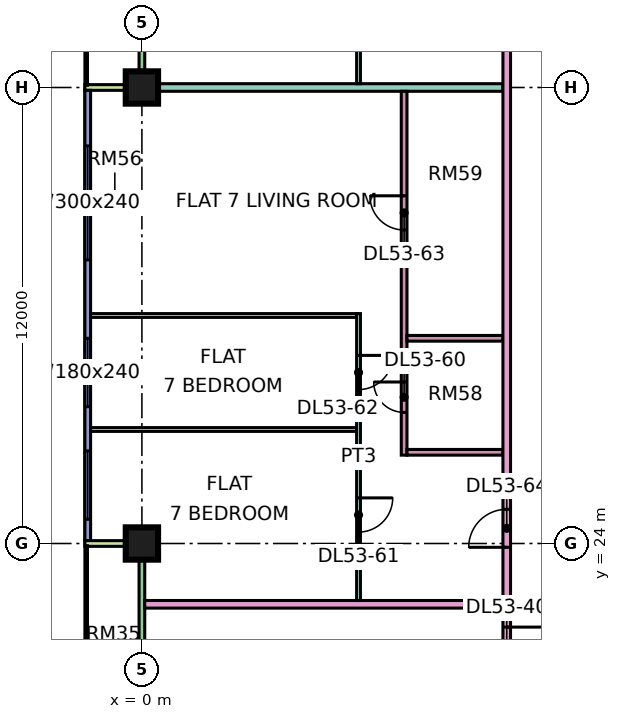
"""IFC4 building model, lengths in metres.
Left out: names, types, materials, properties, quantities, classifications, styles, units other than length and angle.
Written with IfcOpenShell. Run it as: python <this file> out.ifc"""

import sys

from ifc_helpers import new_model, si_unit, direction, frame, frame_2d, origin, origin_2d, place, context, subcontext, project, spatial, rectangle, extrude, element, fill, save


model = new_model("IFC4")
c1 = context("Model", 3, precision=1e-05, world=origin(), true_north=direction((0.0, 1.0)))
c2 = subcontext(c1, "Body", "Model", "MODEL_VIEW")
j1 = project(units=[si_unit("LENGTHUNIT", "METRE"), si_unit("PLANEANGLEUNIT", "RADIAN")], contexts=[c1])
p1 = place(None, origin())
s1 = spatial("IfcSite", under=j1, at=p1, CompositionType="ELEMENT")
p2 = place(p1, origin())
s2 = spatial("IfcBuilding", under=s1, at=p2, CompositionType="ELEMENT")
p3 = place(p2, frame((0.0, 0.0, 226.65)))
s3 = spatial("IfcBuildingStorey", under=s2, at=p3, CompositionType="ELEMENT", Elevation=226.65)
p4 = place(p3, frame((0.0, 24.0, 0.0), z_axis=(0.0, 0.0, 1.0), x_axis=(1.0, 0.0, 0.0)))
e1 = element("IfcColumn", 1, at=p4, inside=s3, PredefinedType="COLUMN", context=c2, shape_type="SweptSolid", body=[
    extrude(rectangle(XDim=0.85, YDim=0.85, at=origin_2d()), origin(), (0.0, 0.0, 1.0), 3.75),
])
p5 = place(p3, frame((0.0, 36.0, 0.0), z_axis=(0.0, 0.0, 1.0), x_axis=(1.0, 0.0, 0.0)))
e2 = element("IfcColumn", 2, at=p5, inside=s3, PredefinedType="COLUMN", context=c2, shape_type="SweptSolid", body=[
    extrude(rectangle(XDim=0.85, YDim=0.85, at=origin_2d()), origin(), (0.0, 0.0, 1.0), 3.75),
])
p6 = place(p3, frame((0.0, 47.925, 0.0), z_axis=(0.0, 0.0, 1.0), x_axis=(0.0, -1.0, 0.0)))
e3 = element("IfcWall", 3, at=p6, inside=s3, PredefinedType="SOLIDWALL", context=c2, shape_type="SweptSolid", body=[
    extrude(rectangle(XDim=11.85, YDim=0.15, at=frame_2d((5.925, 0.0))), origin(), (0.0, 0.0, 1.0), 3.35),
])
p7 = place(p6, frame((0.6, 0.0, 0.45)))
e4 = element("IfcOpeningElement", 4, at=p7, cuts=e3, PredefinedType="OPENING", context=c2, shape_type="SweptSolid", body=[
    extrude(rectangle(XDim=1.2, YDim=2.4, at=frame_2d((0.6, 1.2))), frame((0.0, 0.085, 0.0), z_axis=(0.0, -1.0, 0.0), x_axis=(1.0, 0.0, 0.0)), (0.0, 0.0, 1.0), 0.17),
])
p8 = place(p6, frame((4.087, 0.0, 0.0)))
e5 = element("IfcOpeningElement", 5, at=p8, cuts=e3, PredefinedType="OPENING", context=c2, shape_type="SweptSolid", body=[
    extrude(rectangle(XDim=1.2, YDim=2.4, at=frame_2d((0.6, 1.2))), frame((0.0, 0.085, 0.0), z_axis=(0.0, -1.0, 0.0), x_axis=(1.0, 0.0, 0.0)), (0.0, 0.0, 1.0), 0.17),
])
p9 = place(p6, frame((6.525, 0.0, 0.45)))
e6 = element("IfcOpeningElement", 6, at=p9, cuts=e3, PredefinedType="OPENING", context=c2, shape_type="SweptSolid", body=[
    extrude(rectangle(XDim=1.8, YDim=2.4, at=frame_2d((0.9, 1.2))), frame((0.0, 0.085, 0.0), z_axis=(0.0, -1.0, 0.0), x_axis=(1.0, 0.0, 0.0)), (0.0, 0.0, 1.0), 0.17),
])
p10 = place(p6, frame((9.562, 0.0, 0.45)))
e7 = element("IfcOpeningElement", 7, at=p10, cuts=e3, PredefinedType="OPENING", context=c2, shape_type="SweptSolid", body=[
    extrude(rectangle(XDim=1.2, YDim=2.4, at=frame_2d((0.6, 1.2))), frame((0.0, 0.085, 0.0), z_axis=(0.0, -1.0, 0.0), x_axis=(1.0, 0.0, 0.0)), (0.0, 0.0, 1.0), 0.17),
])
p11 = place(p3, frame((-1.5, 36.0, 0.0), z_axis=(0.0, 0.0, 1.0), x_axis=(1.0, 0.0, 0.0)))
e8 = element("IfcWall", 8, at=p11, inside=s3, PredefinedType="SOLIDWALL", context=c2, shape_type="SweptSolid", body=[
    extrude(rectangle(XDim=1.5, YDim=0.15, at=frame_2d((0.75, 0.0))), origin(), (0.0, 0.0, 1.0), 3.35),
])
p12 = place(p3, frame((-1.425, 35.925, 0.0), z_axis=(0.0, 0.0, 1.0), x_axis=(0.0, -1.0, 0.0)))
e9 = element("IfcWall", 9, at=p12, inside=s3, PredefinedType="SOLIDWALL", context=c2, shape_type="SweptSolid", body=[
    extrude(rectangle(XDim=11.85, YDim=0.15, at=frame_2d((5.925, 0.0))), origin(), (0.0, 0.0, 1.0), 3.35),
])
p13 = place(p12, frame((1.462, 0.0, 0.45)))
e10 = element("IfcOpeningElement", 10, at=p13, cuts=e9, PredefinedType="OPENING", context=c2, shape_type="SweptSolid", body=[
    extrude(rectangle(XDim=3.0, YDim=2.4, at=frame_2d((1.5, 1.2))), frame((0.0, 0.085, 0.0), z_axis=(0.0, -1.0, 0.0), x_axis=(1.0, 0.0, 0.0)), (0.0, 0.0, 1.0), 0.17),
])
p14 = place(p12, frame((6.525, 0.0, 0.45)))
e11 = element("IfcOpeningElement", 11, at=p14, cuts=e9, PredefinedType="OPENING", context=c2, shape_type="SweptSolid", body=[
    extrude(rectangle(XDim=1.8, YDim=2.4, at=frame_2d((0.9, 1.2))), frame((0.0, 0.085, 0.0), z_axis=(0.0, -1.0, 0.0), x_axis=(1.0, 0.0, 0.0)), (0.0, 0.0, 1.0), 0.17),
])
p15 = place(p12, frame((9.488, 0.0, 0.45)))
e12 = element("IfcOpeningElement", 12, at=p15, cuts=e9, PredefinedType="OPENING", context=c2, shape_type="SweptSolid", body=[
    extrude(rectangle(XDim=1.8, YDim=2.4, at=frame_2d((0.9, 1.2))), frame((0.0, 0.085, 0.0), z_axis=(0.0, -1.0, 0.0), x_axis=(1.0, 0.0, 0.0)), (0.0, 0.0, 1.0), 0.17),
])
p16 = place(p3, frame((0.0, 23.925, 0.0), z_axis=(0.0, 0.0, 1.0), x_axis=(0.0, -1.0, 0.0)))
e13 = element("IfcWall", 13, at=p16, inside=s3, PredefinedType="SOLIDWALL", context=c2, shape_type="SweptSolid", body=[
    extrude(rectangle(XDim=11.35, YDim=0.15, at=frame_2d((5.675, 0.0))), origin(), (0.0, 0.0, 1.0), 3.35),
])
p17 = place(p16, frame((6.738, 0.0, 0.0)))
e14 = element("IfcOpeningElement", 14, at=p17, cuts=e13, PredefinedType="OPENING", context=c2, shape_type="SweptSolid", body=[
    extrude(rectangle(XDim=1.8, YDim=2.4, at=frame_2d((0.9, 1.2))), frame((0.0, 0.085, 0.0), z_axis=(0.0, -1.0, 0.0), x_axis=(1.0, 0.0, 0.0)), (0.0, 0.0, 1.0), 0.17),
])
p18 = place(p3, frame((-1.5, 24.0, 0.0), z_axis=(0.0, 0.0, 1.0), x_axis=(1.0, 0.0, 0.0)))
e15 = element("IfcWall", 15, at=p18, inside=s3, PredefinedType="SOLIDWALL", context=c2, shape_type="SweptSolid", body=[
    extrude(rectangle(XDim=1.5, YDim=0.15, at=frame_2d((0.75, 0.0))), origin(), (0.0, 0.0, 1.0), 3.35),
])
p19 = place(p3, frame((-1.351, 27.0, 0.0), z_axis=(0.0, 0.0, 1.0), x_axis=(1.0, 0.0, 0.0)))
e16 = element("IfcWall", 16, at=p19, inside=s3, PredefinedType="PARTITIONING", context=c2, shape_type="SweptSolid", body=[
    extrude(rectangle(XDim=7.001, YDim=0.1, at=frame_2d((3.5, 0.0))), origin(), (0.0, 0.0, 1.0), 3.35),
])
p20 = place(p3, frame((-1.35, 30.0, 0.0), z_axis=(0.0, 0.0, 1.0), x_axis=(1.0, 0.0, 0.0)))
e17 = element("IfcWall", 17, at=p20, inside=s3, PredefinedType="PARTITIONING", context=c2, shape_type="SweptSolid", body=[
    extrude(rectangle(XDim=7.0, YDim=0.1, at=frame_2d((3.5, 0.0))), origin(), (0.0, 0.0, 1.0), 3.35),
])
e18 = element("IfcWall", 18, at=p5, inside=s3, PredefinedType="PARTITIONING", context=c2, shape_type="SweptSolid", body=[
    extrude(rectangle(XDim=9.5, YDim=0.2, at=frame_2d((4.75, 0.0))), origin(), (0.0, 0.0, 1.0), 3.35),
])
p21 = place(p3, frame((0.074, 22.4, 0.0), z_axis=(0.0, 0.0, 1.0), x_axis=(1.0, 0.0, 0.0)))
e19 = element("IfcWall", 19, at=p21, inside=s3, PredefinedType="PARTITIONING", context=c2, shape_type="SweptSolid", body=[
    extrude(rectangle(XDim=9.426, YDim=0.2, at=frame_2d((4.713, 0.0))), origin(), (0.0, 0.0, 1.0), 3.35),
])
p22 = place(p3, frame((5.7, 22.5, 0.0), z_axis=(0.0, 0.0, 1.0), x_axis=(0.0, 1.0, 0.0)))
e20 = element("IfcWall", 20, at=p22, inside=s3, PredefinedType="PARTITIONING", context=c2, shape_type="SweptSolid", body=[
    extrude(rectangle(XDim=7.55, YDim=0.1, at=frame_2d((3.775, 0.0))), origin(), (0.0, 0.0, 1.0), 3.35),
])
p23 = place(p22, frame((1.8, 0.0, 0.0)))
e21 = element("IfcOpeningElement", 21, at=p23, cuts=e20, PredefinedType="OPENING", context=c2, shape_type="SweptSolid", body=[
    extrude(rectangle(XDim=0.9, YDim=2.1, at=frame_2d((0.45, 1.05))), frame((0.0, 0.06, 0.0), z_axis=(0.0, -1.0, 0.0), x_axis=(1.0, 0.0, 0.0)), (0.0, 0.0, 1.0), 0.12),
])
p24 = place(p22, frame((5.55, 0.0, 0.0)))
e22 = element("IfcOpeningElement", 22, at=p24, cuts=e20, PredefinedType="OPENING", context=c2, shape_type="SweptSolid", body=[
    extrude(rectangle(XDim=0.9, YDim=2.1, at=frame_2d((0.45, 1.05))), frame((0.0, 0.06, 0.0), z_axis=(0.0, -1.0, 0.0), x_axis=(1.0, 0.0, 0.0)), (0.0, 0.0, 1.0), 0.12),
])
p25 = place(p3, frame((5.7, 36.1, 0.0), z_axis=(0.0, 0.0, 1.0), x_axis=(0.0, 1.0, 0.0)))
e23 = element("IfcWall", 23, at=p25, inside=s3, PredefinedType="PARTITIONING", context=c2, shape_type="SweptSolid", body=[
    extrude(rectangle(XDim=28.25, YDim=0.1, at=frame_2d((14.125, 0.0))), origin(), (0.0, 0.0, 1.0), 3.35),
])
p26 = place(p25, frame((0.95, 0.0, 0.0)))
e24 = element("IfcOpeningElement", 24, at=p26, cuts=e23, PredefinedType="OPENING", context=c2, shape_type="SweptSolid", body=[
    extrude(rectangle(XDim=0.9, YDim=2.1, at=frame_2d((0.45, 1.05))), frame((0.0, 0.06, 0.0), z_axis=(0.0, -1.0, 0.0), x_axis=(1.0, 0.0, 0.0)), (0.0, 0.0, 1.0), 0.12),
])
p27 = place(p25, frame((3.95, 0.0, 0.0)))
e25 = element("IfcOpeningElement", 25, at=p27, cuts=e23, PredefinedType="OPENING", context=c2, shape_type="SweptSolid", body=[
    extrude(rectangle(XDim=0.9, YDim=2.1, at=frame_2d((0.45, 1.05))), frame((0.0, 0.06, 0.0), z_axis=(0.0, -1.0, 0.0), x_axis=(1.0, 0.0, 0.0)), (0.0, 0.0, 1.0), 0.12),
])
p28 = place(p25, frame((6.95, 0.0, 0.0)))
e26 = element("IfcOpeningElement", 26, at=p28, cuts=e23, PredefinedType="OPENING", context=c2, shape_type="SweptSolid", body=[
    extrude(rectangle(XDim=0.9, YDim=2.1, at=frame_2d((0.45, 1.05))), frame((0.0, 0.06, 0.0), z_axis=(0.0, -1.0, 0.0), x_axis=(1.0, 0.0, 0.0)), (0.0, 0.0, 1.0), 0.12),
])
p29 = place(p25, frame((18.95, 0.0, 0.0)))
e27 = element("IfcOpeningElement", 27, at=p29, cuts=e23, PredefinedType="OPENING", context=c2, shape_type="SweptSolid", body=[
    extrude(rectangle(XDim=0.9, YDim=2.1, at=frame_2d((0.45, 1.05))), frame((0.0, 0.06, 0.0), z_axis=(0.0, -1.0, 0.0), x_axis=(1.0, 0.0, 0.0)), (0.0, 0.0, 1.0), 0.12),
])
p30 = place(p25, frame((21.95, 0.0, 0.0)))
e28 = element("IfcOpeningElement", 28, at=p30, cuts=e23, PredefinedType="OPENING", context=c2, shape_type="SweptSolid", body=[
    extrude(rectangle(XDim=0.9, YDim=2.1, at=frame_2d((0.45, 1.05))), frame((0.0, 0.06, 0.0), z_axis=(0.0, -1.0, 0.0), x_axis=(1.0, 0.0, 0.0)), (0.0, 0.0, 1.0), 0.12),
])
p31 = place(p25, frame((24.95, 0.0, 0.0)))
e29 = element("IfcOpeningElement", 29, at=p31, cuts=e23, PredefinedType="OPENING", context=c2, shape_type="SweptSolid", body=[
    extrude(rectangle(XDim=0.9, YDim=2.1, at=frame_2d((0.45, 1.05))), frame((0.0, 0.06, 0.0), z_axis=(0.0, -1.0, 0.0), x_axis=(1.0, 0.0, 0.0)), (0.0, 0.0, 1.0), 0.12),
])
p32 = place(p25, frame((12.95, 0.0, 0.0)))
e30 = element("IfcOpeningElement", 30, at=p32, cuts=e23, PredefinedType="OPENING", context=c2, shape_type="SweptSolid", body=[
    extrude(rectangle(XDim=0.9, YDim=2.1, at=frame_2d((0.45, 1.05))), frame((0.0, 0.06, 0.0), z_axis=(0.0, -1.0, 0.0), x_axis=(1.0, 0.0, 0.0)), (0.0, 0.0, 1.0), 0.12),
])
p33 = place(p3, frame((6.9, 26.325, 0.0), z_axis=(0.0, 0.0, 1.0), x_axis=(0.0, 1.0, 0.0)))
e31 = element("IfcWall", 31, at=p33, inside=s3, PredefinedType="PARTITIONING", context=c2, shape_type="SweptSolid", body=[
    extrude(rectangle(XDim=9.575, YDim=0.15, at=frame_2d((4.788, 0.0))), origin(), (0.0, 0.0, 1.0), 3.35),
])
p34 = place(p33, frame((1.125, 0.0, 0.0)))
e32 = element("IfcOpeningElement", 32, at=p34, cuts=e31, PredefinedType="OPENING", context=c2, shape_type="SweptSolid", body=[
    extrude(rectangle(XDim=0.8, YDim=2.1, at=frame_2d((0.4, 1.05))), frame((0.0, 0.085, 0.0), z_axis=(0.0, -1.0, 0.0), x_axis=(1.0, 0.0, 0.0)), (0.0, 0.0, 1.0), 0.17),
])
p35 = place(p33, frame((5.925, 0.0, 0.0)))
e33 = element("IfcOpeningElement", 33, at=p35, cuts=e31, PredefinedType="OPENING", context=c2, shape_type="SweptSolid", body=[
    extrude(rectangle(XDim=0.9, YDim=2.1, at=frame_2d((0.45, 1.05))), frame((0.0, 0.085, 0.0), z_axis=(0.0, -1.0, 0.0), x_axis=(1.0, 0.0, 0.0)), (0.0, 0.0, 1.0), 0.17),
])
for number, where, z_axis, x_axis in (
    (34, (6.975, 26.4, 0.0), (0.0, 0.0, 1.0), (1.0, 0.0, 0.0)),
    (35, (6.975, 29.4, 0.0), (0.0, 0.0, 1.0), (1.0, 0.0, 0.0)),
):
    element("IfcWall", number, at=place(p3, frame(where, z_axis=z_axis, x_axis=x_axis)), inside=s3, PredefinedType="PARTITIONING", context=c2, shape_type="SweptSolid", body=[
        extrude(rectangle(XDim=2.525, YDim=0.15, at=frame_2d((1.262, 0.0))), origin(), (0.0, 0.0, 1.0), 3.35),
    ])
p36 = place(p3, frame((9.6, 20.0, 0.0), z_axis=(0.0, 0.0, 1.0), x_axis=(0.0, 1.0, 0.0)))
e36 = element("IfcWall", 36, at=p36, inside=s3, PredefinedType="PARTITIONING", context=c2, shape_type="SweptSolid", body=[
    extrude(rectangle(XDim=44.35, YDim=0.2, at=frame_2d((22.175, 0.0))), origin(), (0.0, 0.0, 1.0), 3.35),
])
p37 = place(p36, frame((17.1, 0.0, 0.0)))
e37 = element("IfcOpeningElement", 37, at=p37, cuts=e36, PredefinedType="OPENING", context=c2, shape_type="SweptSolid", body=[
    extrude(rectangle(XDim=1.0, YDim=2.1, at=frame_2d((0.5, 1.05))), frame((0.0, 0.11, 0.0), z_axis=(0.0, -1.0, 0.0), x_axis=(1.0, 0.0, 0.0)), (0.0, 0.0, 1.0), 0.22),
])
p38 = place(p36, frame((0.6, 0.0, 0.0)))
e38 = element("IfcOpeningElement", 38, at=p38, cuts=e36, PredefinedType="OPENING", context=c2, shape_type="SweptSolid", body=[
    extrude(rectangle(XDim=1.2, YDim=2.1, at=frame_2d((0.6, 1.05))), frame((0.0, 0.11, 0.0), z_axis=(0.0, -1.0, 0.0), x_axis=(1.0, 0.0, 0.0)), (0.0, 0.0, 1.0), 0.22),
])
p39 = place(p36, frame((3.9, 0.0, 0.0)))
e39 = element("IfcOpeningElement", 39, at=p39, cuts=e36, PredefinedType="OPENING", context=c2, shape_type="SweptSolid", body=[
    extrude(rectangle(XDim=1.0, YDim=2.1, at=frame_2d((0.5, 1.05))), frame((0.0, 0.11, 0.0), z_axis=(0.0, -1.0, 0.0), x_axis=(1.0, 0.0, 0.0)), (0.0, 0.0, 1.0), 0.22),
])
p40 = place(p13, origin())
e40 = element("IfcWindow", 40, at=p40, inside=s3, PartitioningType="SINGLE_PANEL", PredefinedType="WINDOW", context=c2, shape_type="SweptSolid", body=[
    extrude(rectangle(XDim=3.0, YDim=2.4, at=frame_2d((1.5, 1.2))), frame((0.0, 0.03, 0.0), z_axis=(0.0, -1.0, 0.0), x_axis=(1.0, 0.0, 0.0)), (0.0, 0.0, 1.0), 0.06),
])
fill(e10, e40)
p41 = place(p14, origin())
e41 = element("IfcWindow", 41, at=p41, inside=s3, PartitioningType="SINGLE_PANEL", PredefinedType="WINDOW", context=c2, shape_type="SweptSolid", body=[
    extrude(rectangle(XDim=1.8, YDim=2.4, at=frame_2d((0.9, 1.2))), frame((0.0, 0.03, 0.0), z_axis=(0.0, -1.0, 0.0), x_axis=(1.0, 0.0, 0.0)), (0.0, 0.0, 1.0), 0.06),
])
fill(e11, e41)
p42 = place(p15, origin())
e42 = element("IfcWindow", 42, at=p42, inside=s3, PartitioningType="SINGLE_PANEL", PredefinedType="WINDOW", context=c2, shape_type="SweptSolid", body=[
    extrude(rectangle(XDim=1.8, YDim=2.4, at=frame_2d((0.9, 1.2))), frame((0.0, 0.03, 0.0), z_axis=(0.0, -1.0, 0.0), x_axis=(1.0, 0.0, 0.0)), (0.0, 0.0, 1.0), 0.06),
])
fill(e12, e42)
p43 = place(p38, origin())
e43 = element("IfcDoor", 43, at=p43, inside=s3, OperationType="SINGLE_SWING_RIGHT", PredefinedType="DOOR", context=c2, shape_type="SweptSolid", body=[
    extrude(rectangle(XDim=1.2, YDim=2.1, at=frame_2d((0.6, 1.05))), frame((0.0, 0.025, 0.0), z_axis=(0.0, -1.0, 0.0), x_axis=(1.0, 0.0, 0.0)), (0.0, 0.0, 1.0), 0.05),
])
fill(e38, e43)
p44 = place(p34, frame((0.8, 0.0, 0.0), z_axis=(0.0, 0.0, 1.0), x_axis=(-1.0, 0.0, 0.0)))
e44 = element("IfcDoor", 44, at=p44, inside=s3, OperationType="SINGLE_SWING_RIGHT", PredefinedType="DOOR", context=c2, shape_type="SweptSolid", body=[
    extrude(rectangle(XDim=0.8, YDim=2.1, at=frame_2d((0.4, 1.05))), frame((0.0, 0.025, 0.0), z_axis=(0.0, -1.0, 0.0), x_axis=(1.0, 0.0, 0.0)), (0.0, 0.0, 1.0), 0.05),
])
fill(e32, e44)
p45 = place(p23, origin())
e45 = element("IfcDoor", 45, at=p45, inside=s3, OperationType="SINGLE_SWING_RIGHT", PredefinedType="DOOR", context=c2, shape_type="SweptSolid", body=[
    extrude(rectangle(XDim=0.9, YDim=2.1, at=frame_2d((0.45, 1.05))), frame((0.0, 0.025, 0.0), z_axis=(0.0, -1.0, 0.0), x_axis=(1.0, 0.0, 0.0)), (0.0, 0.0, 1.0), 0.05),
])
fill(e21, e45)
p46 = place(p24, origin())
e46 = element("IfcDoor", 46, at=p46, inside=s3, OperationType="SINGLE_SWING_RIGHT", PredefinedType="DOOR", context=c2, shape_type="SweptSolid", body=[
    extrude(rectangle(XDim=0.9, YDim=2.1, at=frame_2d((0.45, 1.05))), frame((0.0, 0.025, 0.0), z_axis=(0.0, -1.0, 0.0), x_axis=(1.0, 0.0, 0.0)), (0.0, 0.0, 1.0), 0.05),
])
fill(e22, e46)
p47 = place(p35, frame((0.9, 0.0, 0.0), z_axis=(0.0, 0.0, 1.0), x_axis=(-1.0, 0.0, 0.0)))
e47 = element("IfcDoor", 47, at=p47, inside=s3, OperationType="SINGLE_SWING_RIGHT", PredefinedType="DOOR", context=c2, shape_type="SweptSolid", body=[
    extrude(rectangle(XDim=0.9, YDim=2.1, at=frame_2d((0.45, 1.05))), frame((0.0, 0.025, 0.0), z_axis=(0.0, -1.0, 0.0), x_axis=(1.0, 0.0, 0.0)), (0.0, 0.0, 1.0), 0.05),
])
fill(e33, e47)
p48 = place(p39, origin())
e48 = element("IfcDoor", 48, at=p48, inside=s3, OperationType="SINGLE_SWING_LEFT", PredefinedType="DOOR", context=c2, shape_type="SweptSolid", body=[
    extrude(rectangle(XDim=1.0, YDim=2.1, at=frame_2d((0.5, 1.05))), frame((0.0, 0.025, 0.0), z_axis=(0.0, -1.0, 0.0), x_axis=(1.0, 0.0, 0.0)), (0.0, 0.0, 1.0), 0.05),
])
fill(e39, e48)
save(model, sys.argv[1])
